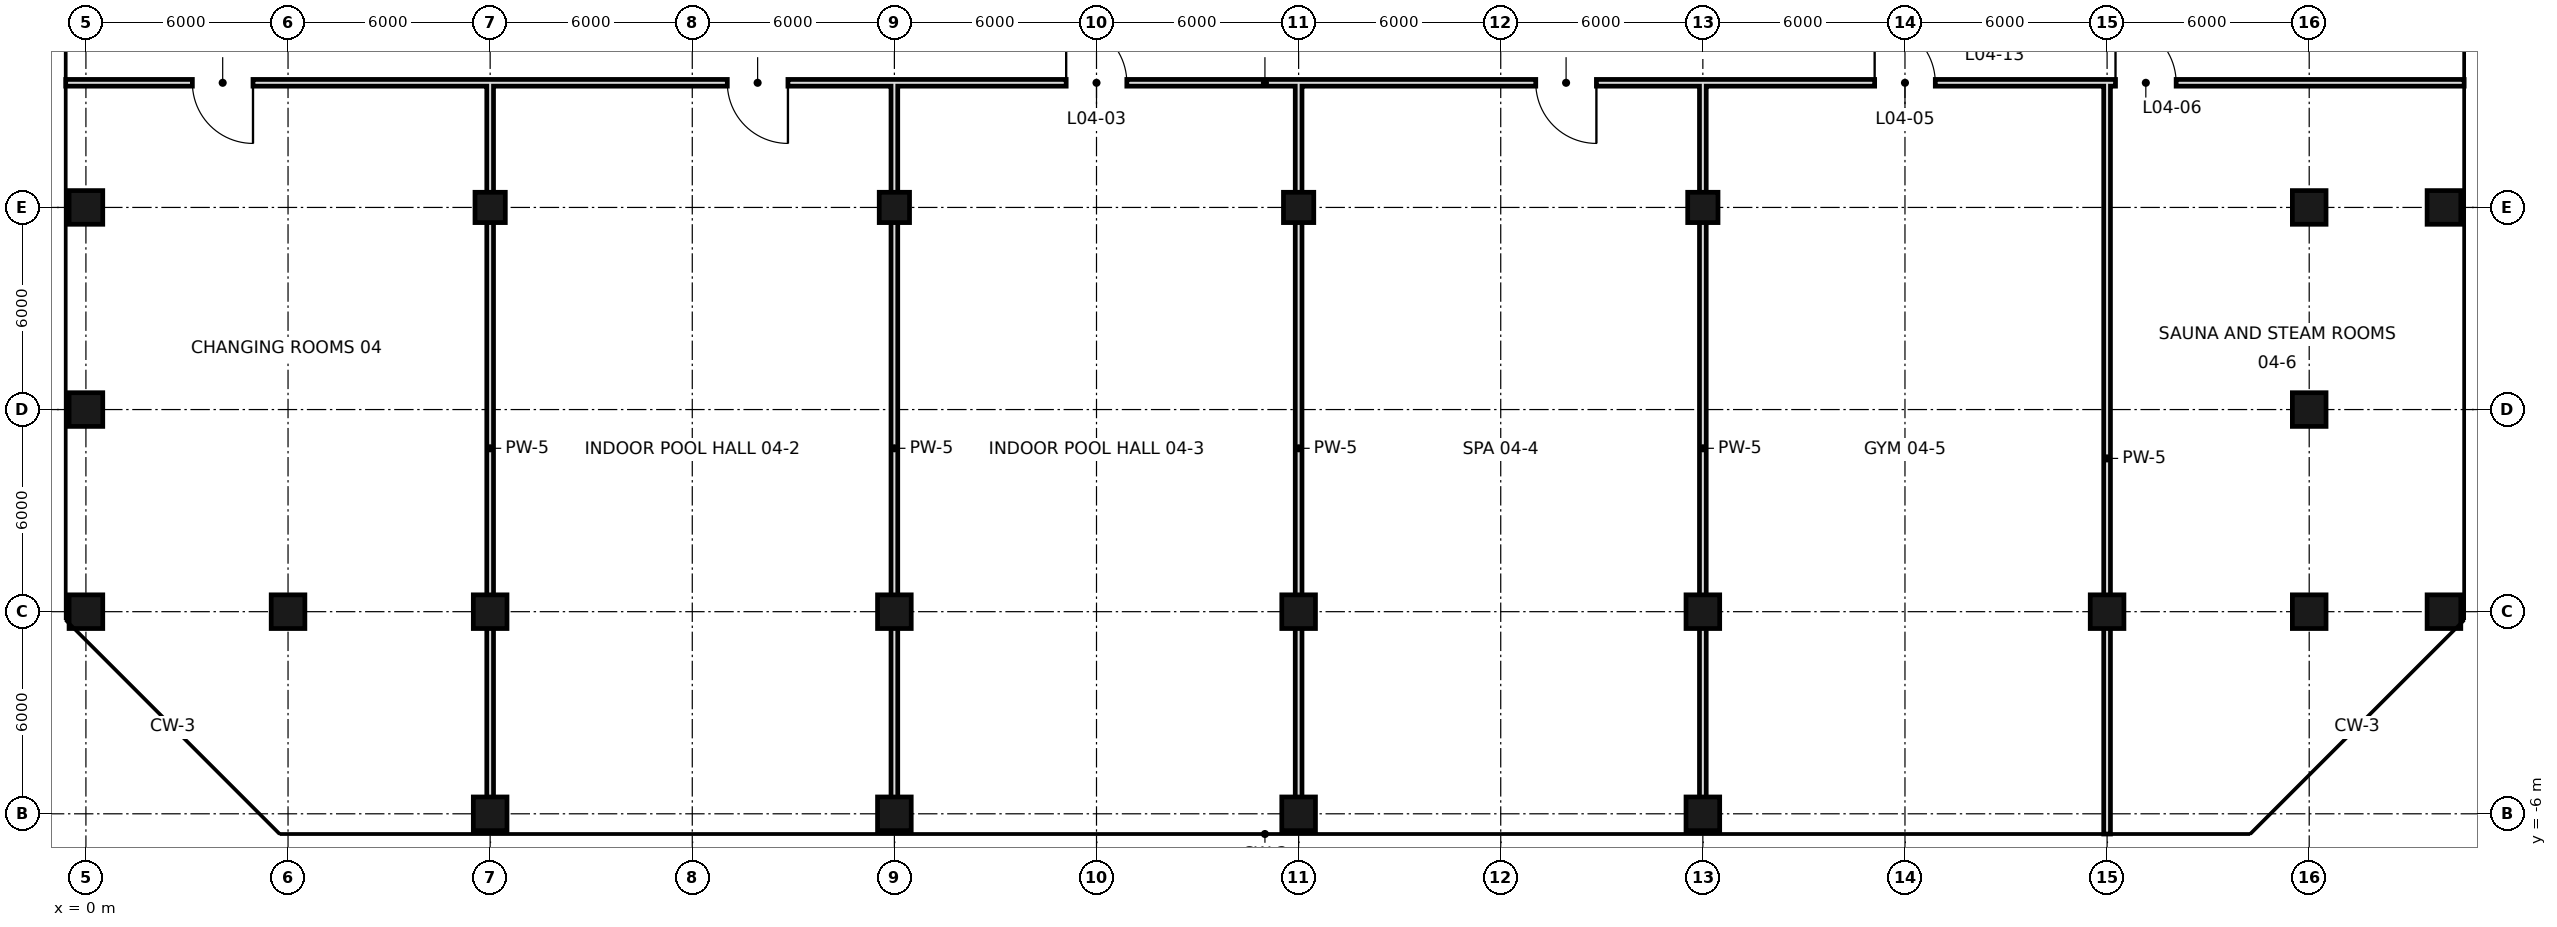
"""IFC4 building model, lengths in metres.
Left out: names, types, materials, properties, quantities, classifications, styles, units other than length and angle.
Written with IfcOpenShell. Run it as: python <this file> out.ifc"""

import sys

from ifc_helpers import new_model, si_unit, direction, frame, frame_2d, origin, origin_2d, place, context, subcontext, project, spatial, rectangle, hollow_rectangle, extrude, element, fill, save


model = new_model("IFC4")
c1 = context("Model", 3, precision=1e-05, world=origin(), true_north=direction((0.0, 1.0)))
c2 = subcontext(c1, "Body", "Model", "MODEL_VIEW")
j1 = project(units=[si_unit("LENGTHUNIT", "METRE"), si_unit("PLANEANGLEUNIT", "RADIAN")], contexts=[c1])
p1 = place(None, origin())
s1 = spatial("IfcSite", under=j1, at=p1, CompositionType="ELEMENT")
p2 = place(p1, origin())
s2 = spatial("IfcBuilding", under=s1, at=p2, CompositionType="ELEMENT")
p3 = place(p2, frame((0.0, 0.0, 30.0)))
s3 = spatial("IfcBuildingStorey", under=s2, at=p3, CompositionType="ELEMENT", Elevation=30.0)
for number, where, z_axis, x_axis in (
    (1, (0.0, 0.0, 0.0), (0.0, 0.0, 1.0), (1.0, 0.0, 0.0)),
    (2, (0.0, 6.0, 0.0), (0.0, 0.0, 1.0), (1.0, 0.0, 0.0)),
    (3, (0.0, 12.0, 0.0), (0.0, 0.0, 1.0), (1.0, 0.0, 0.0)),
    (4, (6.0, 0.0, 0.0), (0.0, 0.0, 1.0), (1.0, 0.0, 0.0)),
    (5, (12.0, -6.0, 0.0), (0.0, 0.0, 1.0), (1.0, 0.0, 0.0)),
    (6, (12.0, 0.0, 0.0), (0.0, 0.0, 1.0), (1.0, 0.0, 0.0)),
):
    element("IfcColumn", number, at=place(p3, frame(where, z_axis=z_axis, x_axis=x_axis)), inside=s3, PredefinedType="COLUMN", context=c2, shape_type="SweptSolid", body=[
        extrude(hollow_rectangle(XDim=1.0, YDim=1.0, WallThickness=0.05, at=origin_2d()), origin(), (0.0, 0.0, 1.0), 4.8),
    ])
p4 = place(p3, frame((12.0, 12.0, 0.0), z_axis=(0.0, 0.0, 1.0), x_axis=(1.0, 0.0, 0.0)))
e7 = element("IfcColumn", 7, at=p4, inside=s3, PredefinedType="COLUMN", context=c2, shape_type="SweptSolid", body=[
    extrude(hollow_rectangle(XDim=0.9, YDim=0.9, WallThickness=0.045, at=origin_2d()), origin(), (0.0, 0.0, 1.0), 4.8),
])
for number, where, z_axis, x_axis in (
    (8, (24.0, -6.0, 0.0), (0.0, 0.0, 1.0), (1.0, 0.0, 0.0)),
    (9, (24.0, 0.0, 0.0), (0.0, 0.0, 1.0), (1.0, 0.0, 0.0)),
):
    element("IfcColumn", number, at=place(p3, frame(where, z_axis=z_axis, x_axis=x_axis)), inside=s3, PredefinedType="COLUMN", context=c2, shape_type="SweptSolid", body=[
        extrude(hollow_rectangle(XDim=1.0, YDim=1.0, WallThickness=0.05, at=origin_2d()), origin(), (0.0, 0.0, 1.0), 4.8),
    ])
p5 = place(p3, frame((24.0, 12.0, 0.0), z_axis=(0.0, 0.0, 1.0), x_axis=(1.0, 0.0, 0.0)))
e10 = element("IfcColumn", 10, at=p5, inside=s3, PredefinedType="COLUMN", context=c2, shape_type="SweptSolid", body=[
    extrude(hollow_rectangle(XDim=0.9, YDim=0.9, WallThickness=0.045, at=origin_2d()), origin(), (0.0, 0.0, 1.0), 4.8),
])
for number, where, z_axis, x_axis in (
    (11, (36.0, -6.0, 0.0), (0.0, 0.0, 1.0), (1.0, 0.0, 0.0)),
    (12, (36.0, 0.0, 0.0), (0.0, 0.0, 1.0), (1.0, 0.0, 0.0)),
):
    element("IfcColumn", number, at=place(p3, frame(where, z_axis=z_axis, x_axis=x_axis)), inside=s3, PredefinedType="COLUMN", context=c2, shape_type="SweptSolid", body=[
        extrude(hollow_rectangle(XDim=1.0, YDim=1.0, WallThickness=0.05, at=origin_2d()), origin(), (0.0, 0.0, 1.0), 4.8),
    ])
p6 = place(p3, frame((36.0, 12.0, 0.0), z_axis=(0.0, 0.0, 1.0), x_axis=(1.0, 0.0, 0.0)))
e13 = element("IfcColumn", 13, at=p6, inside=s3, PredefinedType="COLUMN", context=c2, shape_type="SweptSolid", body=[
    extrude(hollow_rectangle(XDim=0.9, YDim=0.9, WallThickness=0.045, at=origin_2d()), origin(), (0.0, 0.0, 1.0), 4.8),
])
for number, where, z_axis, x_axis in (
    (14, (48.0, -6.0, 0.0), (0.0, 0.0, 1.0), (1.0, 0.0, 0.0)),
    (15, (48.0, 0.0, 0.0), (0.0, 0.0, 1.0), (1.0, 0.0, 0.0)),
):
    element("IfcColumn", number, at=place(p3, frame(where, z_axis=z_axis, x_axis=x_axis)), inside=s3, PredefinedType="COLUMN", context=c2, shape_type="SweptSolid", body=[
        extrude(hollow_rectangle(XDim=1.0, YDim=1.0, WallThickness=0.05, at=origin_2d()), origin(), (0.0, 0.0, 1.0), 4.8),
    ])
p7 = place(p3, frame((48.0, 12.0, 0.0), z_axis=(0.0, 0.0, 1.0), x_axis=(1.0, 0.0, 0.0)))
e16 = element("IfcColumn", 16, at=p7, inside=s3, PredefinedType="COLUMN", context=c2, shape_type="SweptSolid", body=[
    extrude(hollow_rectangle(XDim=0.9, YDim=0.9, WallThickness=0.045, at=origin_2d()), origin(), (0.0, 0.0, 1.0), 4.8),
])
for number, where, z_axis, x_axis in (
    (17, (60.0, 0.0, 0.0), (0.0, 0.0, 1.0), (1.0, 0.0, 0.0)),
    (18, (66.0, 0.0, 0.0), (0.0, 0.0, 1.0), (1.0, 0.0, 0.0)),
    (19, (66.0, 6.0, 0.0), (0.0, 0.0, 1.0), (1.0, 0.0, 0.0)),
    (20, (66.0, 12.0, 0.0), (0.0, 0.0, 1.0), (1.0, 0.0, 0.0)),
    (21, (70.0, 0.0, 0.0), (0.0, 0.0, 1.0), (1.0, 0.0, 0.0)),
    (22, (70.0, 12.0, 0.0), (0.0, 0.0, 1.0), (1.0, 0.0, 0.0)),
):
    element("IfcColumn", number, at=place(p3, frame(where, z_axis=z_axis, x_axis=x_axis)), inside=s3, PredefinedType="COLUMN", context=c2, shape_type="SweptSolid", body=[
        extrude(hollow_rectangle(XDim=1.0, YDim=1.0, WallThickness=0.05, at=origin_2d()), origin(), (0.0, 0.0, 1.0), 4.8),
    ])
for number, where, z_axis, x_axis in (
    (23, (12.0, -6.0, 0.0), (0.0, 0.0, 1.0), (0.0, 1.0, 0.0)),
    (24, (24.0, -6.0, 0.0), (0.0, 0.0, 1.0), (0.0, 1.0, 0.0)),
    (25, (36.0, -6.0, 0.0), (0.0, 0.0, 1.0), (0.0, 1.0, 0.0)),
    (26, (48.0, -6.0, 0.0), (0.0, 0.0, 1.0), (0.0, 1.0, 0.0)),
):
    element("IfcWall", number, at=place(p3, frame(where, z_axis=z_axis, x_axis=x_axis)), inside=s3, PredefinedType="SOLIDWALL", context=c2, shape_type="SweptSolid", body=[
        extrude(rectangle(XDim=21.7, YDim=0.2, at=frame_2d((10.85, 0.0))), origin(), (0.0, 0.0, 1.0), 3.7),
    ])
p8 = place(p3, frame((60.0, -6.6, 0.0), z_axis=(0.0, 0.0, 1.0), x_axis=(0.0, 1.0, 0.0)))
e27 = element("IfcWall", 27, at=p8, inside=s3, PredefinedType="SOLIDWALL", context=c2, shape_type="SweptSolid", body=[
    extrude(rectangle(XDim=22.3, YDim=0.2, at=frame_2d((11.15, 0.0))), origin(), (0.0, 0.0, 1.0), 3.5),
])
p9 = place(p3, frame((-0.6, 15.7, 0.0), z_axis=(0.0, 0.0, 1.0), x_axis=(1.0, 0.0, 0.0)))
e28 = element("IfcWall", 28, at=p9, inside=s3, PredefinedType="SOLIDWALL", context=c2, shape_type="SweptSolid", body=[
    extrude(rectangle(XDim=71.2, YDim=0.2, at=frame_2d((35.6, 0.0))), origin(), (0.0, 0.0, 1.0), 3.7),
])
p10 = place(p9, frame((3.76, 0.0, 0.0)))
e29 = element("IfcOpeningElement", 29, at=p10, cuts=e28, PredefinedType="OPENING", context=c2, shape_type="SweptSolid", body=[
    extrude(rectangle(XDim=1.8, YDim=2.4, at=frame_2d((0.9, 1.2))), frame((0.0, 0.11, 0.0), z_axis=(0.0, -1.0, 0.0), x_axis=(1.0, 0.0, 0.0)), (0.0, 0.0, 1.0), 0.22),
])
p11 = place(p9, frame((19.64, 0.0, 0.0)))
e30 = element("IfcOpeningElement", 30, at=p11, cuts=e28, PredefinedType="OPENING", context=c2, shape_type="SweptSolid", body=[
    extrude(rectangle(XDim=1.8, YDim=2.4, at=frame_2d((0.9, 1.2))), frame((0.0, 0.11, 0.0), z_axis=(0.0, -1.0, 0.0), x_axis=(1.0, 0.0, 0.0)), (0.0, 0.0, 1.0), 0.22),
])
p12 = place(p9, frame((29.7, 0.0, 0.0)))
e31 = element("IfcOpeningElement", 31, at=p12, cuts=e28, PredefinedType="OPENING", context=c2, shape_type="SweptSolid", body=[
    extrude(rectangle(XDim=1.8, YDim=2.4, at=frame_2d((0.9, 1.2))), frame((0.0, 0.11, 0.0), z_axis=(0.0, -1.0, 0.0), x_axis=(1.0, 0.0, 0.0)), (0.0, 0.0, 1.0), 0.22),
])
p13 = place(p9, frame((43.64, 0.0, 0.0)))
e32 = element("IfcOpeningElement", 32, at=p13, cuts=e28, PredefinedType="OPENING", context=c2, shape_type="SweptSolid", body=[
    extrude(rectangle(XDim=1.8, YDim=2.4, at=frame_2d((0.9, 1.2))), frame((0.0, 0.11, 0.0), z_axis=(0.0, -1.0, 0.0), x_axis=(1.0, 0.0, 0.0)), (0.0, 0.0, 1.0), 0.22),
])
p14 = place(p9, frame((53.7, 0.0, 0.0)))
e33 = element("IfcOpeningElement", 33, at=p14, cuts=e28, PredefinedType="OPENING", context=c2, shape_type="SweptSolid", body=[
    extrude(rectangle(XDim=1.8, YDim=2.4, at=frame_2d((0.9, 1.2))), frame((0.0, 0.11, 0.0), z_axis=(0.0, -1.0, 0.0), x_axis=(1.0, 0.0, 0.0)), (0.0, 0.0, 1.0), 0.22),
])
p15 = place(p9, frame((60.85, 0.0, 0.0)))
e34 = element("IfcOpeningElement", 34, at=p15, cuts=e28, PredefinedType="OPENING", context=c2, shape_type="SweptSolid", body=[
    extrude(rectangle(XDim=1.8, YDim=2.4, at=frame_2d((0.9, 1.2))), frame((0.0, 0.11, 0.0), z_axis=(0.0, -1.0, 0.0), x_axis=(1.0, 0.0, 0.0)), (0.0, 0.0, 1.0), 0.22),
])
p16 = place(p10, origin())
e35 = element("IfcDoor", 35, at=p16, inside=s3, OperationType="SINGLE_SWING_RIGHT", PredefinedType="DOOR", context=c2, shape_type="SweptSolid", body=[
    extrude(rectangle(XDim=1.8, YDim=2.4, at=frame_2d((0.9, 1.2))), frame((0.0, 0.025, 0.0), z_axis=(0.0, -1.0, 0.0), x_axis=(1.0, 0.0, 0.0)), (0.0, 0.0, 1.0), 0.05),
])
fill(e29, e35)
p17 = place(p11, origin())
e36 = element("IfcDoor", 36, at=p17, inside=s3, OperationType="SINGLE_SWING_RIGHT", PredefinedType="DOOR", context=c2, shape_type="SweptSolid", body=[
    extrude(rectangle(XDim=1.8, YDim=2.4, at=frame_2d((0.9, 1.2))), frame((0.0, 0.025, 0.0), z_axis=(0.0, -1.0, 0.0), x_axis=(1.0, 0.0, 0.0)), (0.0, 0.0, 1.0), 0.05),
])
fill(e30, e36)
p18 = place(p12, origin())
e37 = element("IfcDoor", 37, at=p18, inside=s3, OperationType="SINGLE_SWING_LEFT", PredefinedType="DOOR", context=c2, shape_type="SweptSolid", body=[
    extrude(rectangle(XDim=1.8, YDim=2.4, at=frame_2d((0.9, 1.2))), frame((0.0, 0.025, 0.0), z_axis=(0.0, -1.0, 0.0), x_axis=(1.0, 0.0, 0.0)), (0.0, 0.0, 1.0), 0.05),
])
fill(e31, e37)
p19 = place(p13, origin())
e38 = element("IfcDoor", 38, at=p19, inside=s3, OperationType="SINGLE_SWING_RIGHT", PredefinedType="DOOR", context=c2, shape_type="SweptSolid", body=[
    extrude(rectangle(XDim=1.8, YDim=2.4, at=frame_2d((0.9, 1.2))), frame((0.0, 0.025, 0.0), z_axis=(0.0, -1.0, 0.0), x_axis=(1.0, 0.0, 0.0)), (0.0, 0.0, 1.0), 0.05),
])
fill(e32, e38)
p20 = place(p14, origin())
e39 = element("IfcDoor", 39, at=p20, inside=s3, OperationType="SINGLE_SWING_LEFT", PredefinedType="DOOR", context=c2, shape_type="SweptSolid", body=[
    extrude(rectangle(XDim=1.8, YDim=2.4, at=frame_2d((0.9, 1.2))), frame((0.0, 0.025, 0.0), z_axis=(0.0, -1.0, 0.0), x_axis=(1.0, 0.0, 0.0)), (0.0, 0.0, 1.0), 0.05),
])
fill(e33, e39)
p21 = place(p15, origin())
e40 = element("IfcDoor", 40, at=p21, inside=s3, OperationType="SINGLE_SWING_LEFT", PredefinedType="DOOR", context=c2, shape_type="SweptSolid", body=[
    extrude(rectangle(XDim=1.8, YDim=2.4, at=frame_2d((0.9, 1.2))), frame((0.0, 0.025, 0.0), z_axis=(0.0, -1.0, 0.0), x_axis=(1.0, 0.0, 0.0)), (0.0, 0.0, 1.0), 0.05),
])
fill(e34, e40)
save(model, sys.argv[1])
